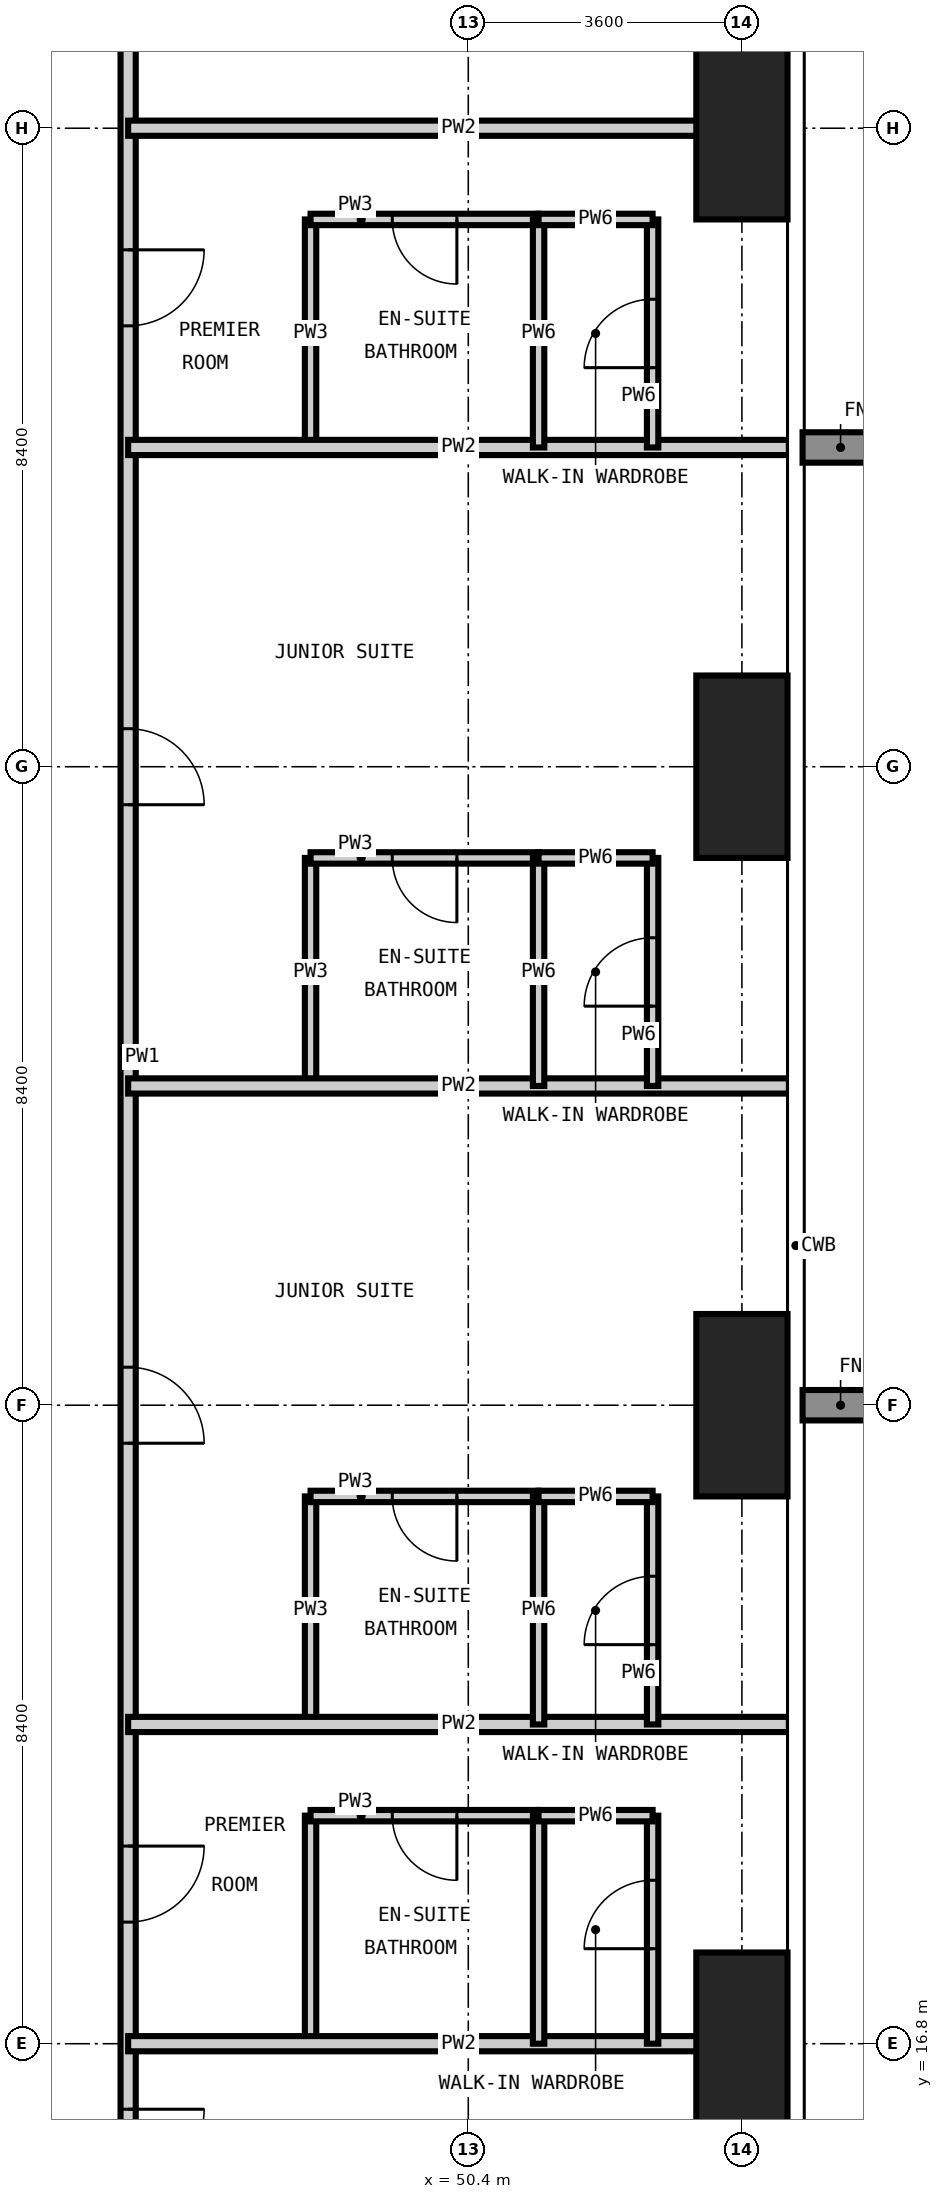
"""IFC4 building model, lengths in metres.
Left out: names, types, materials, properties, quantities, classifications, styles, units other than length and angle.
Written with IfcOpenShell. Run it as: python <this file> out.ifc"""

import sys

from ifc_helpers import new_model, si_unit, direction, frame, frame_2d, origin, origin_2d, place, context, subcontext, project, spatial, rectangle, extrude, element, fill, save


model = new_model("IFC4")
c1 = context("Model", 3, precision=1e-05, world=origin(), true_north=direction((0.0, 1.0)))
c2 = subcontext(c1, "Body", "Model", "MODEL_VIEW")
j1 = project(units=[si_unit("LENGTHUNIT", "METRE"), si_unit("PLANEANGLEUNIT", "RADIAN")], contexts=[c1])
p1 = place(None, origin())
s1 = spatial("IfcSite", under=j1, at=p1, CompositionType="ELEMENT")
p2 = place(p1, origin())
s2 = spatial("IfcBuilding", under=s1, at=p2, CompositionType="ELEMENT")
p3 = place(p2, frame((0.0, 0.0, 100.8)))
s3 = spatial("IfcBuildingStorey", under=s2, at=p3, CompositionType="ELEMENT", Elevation=100.8)
for number, where, z_axis, x_axis in (
    (1, (54.0, 16.8, -0.35), (0.0, 0.0, 1.0), (1.0, 0.0, 0.0)),
    (2, (54.0, 25.2, -0.35), (0.0, 0.0, 1.0), (1.0, 0.0, 0.0)),
    (3, (54.0, 33.6, -0.35), (0.0, 0.0, 1.0), (1.0, 0.0, 0.0)),
    (4, (54.0, 42.0, -0.35), (0.0, 0.0, 1.0), (1.0, 0.0, 0.0)),
):
    element("IfcColumn", number, at=place(p3, frame(where, z_axis=z_axis, x_axis=x_axis)), inside=s3, PredefinedType="COLUMN", context=c2, shape_type="SweptSolid", body=[
        extrude(rectangle(XDim=1.2, YDim=2.4, at=origin_2d()), origin(), (0.0, 0.0, 1.0), 3.6),
    ])
for number, where, z_axis, x_axis in (
    (5, (48.325, 16.8, 0.0), (0.0, 0.0, 1.0), (0.0, 1.0, 0.0)),
    (6, (48.325, 21.0, 0.0), (0.0, 0.0, 1.0), (0.0, 1.0, 0.0)),
    (7, (48.325, 29.4, 0.0), (0.0, 0.0, 1.0), (0.0, 1.0, 0.0)),
    (8, (48.325, 37.8, 0.0), (0.0, 0.0, 1.0), (0.0, 1.0, 0.0)),
):
    element("IfcWall", number, at=place(p3, frame(where, z_axis=z_axis, x_axis=x_axis)), inside=s3, PredefinedType="PARTITIONING", context=c2, shape_type="SweptSolid", body=[
        extrude(rectangle(XDim=3.0, YDim=0.15, at=frame_2d((1.5, 0.0))), origin(), (0.0, 0.0, 1.0), 3.25),
    ])
p4 = place(p3, frame((48.325, 19.8, 0.0), z_axis=(0.0, 0.0, 1.0), x_axis=(1.0, 0.0, 0.0)))
e9 = element("IfcWall", 9, at=p4, inside=s3, PredefinedType="PARTITIONING", context=c2, shape_type="SweptSolid", body=[
    extrude(rectangle(XDim=3.0, YDim=0.15, at=frame_2d((1.5, 0.0))), origin(), (0.0, 0.0, 1.0), 3.25),
])
p5 = place(p4, frame((1.075, 0.0, 0.0)))
e10 = element("IfcOpeningElement", 10, at=p5, cuts=e9, PredefinedType="OPENING", context=c2, shape_type="SweptSolid", body=[
    extrude(rectangle(XDim=0.85, YDim=2.1, at=frame_2d((0.425, 1.05))), frame((0.0, 0.085, 0.0), z_axis=(0.0, -1.0, 0.0), x_axis=(1.0, 0.0, 0.0)), (0.0, 0.0, 1.0), 0.17),
])
p6 = place(p3, frame((48.325, 24.0, 0.0), z_axis=(0.0, 0.0, 1.0), x_axis=(1.0, 0.0, 0.0)))
e11 = element("IfcWall", 11, at=p6, inside=s3, PredefinedType="PARTITIONING", context=c2, shape_type="SweptSolid", body=[
    extrude(rectangle(XDim=3.0, YDim=0.15, at=frame_2d((1.5, 0.0))), origin(), (0.0, 0.0, 1.0), 3.25),
])
p7 = place(p6, frame((1.075, 0.0, 0.0)))
e12 = element("IfcOpeningElement", 12, at=p7, cuts=e11, PredefinedType="OPENING", context=c2, shape_type="SweptSolid", body=[
    extrude(rectangle(XDim=0.85, YDim=2.1, at=frame_2d((0.425, 1.05))), frame((0.0, 0.085, 0.0), z_axis=(0.0, -1.0, 0.0), x_axis=(1.0, 0.0, 0.0)), (0.0, 0.0, 1.0), 0.17),
])
p8 = place(p3, frame((48.325, 32.4, 0.0), z_axis=(0.0, 0.0, 1.0), x_axis=(1.0, 0.0, 0.0)))
e13 = element("IfcWall", 13, at=p8, inside=s3, PredefinedType="PARTITIONING", context=c2, shape_type="SweptSolid", body=[
    extrude(rectangle(XDim=3.0, YDim=0.15, at=frame_2d((1.5, 0.0))), origin(), (0.0, 0.0, 1.0), 3.25),
])
p9 = place(p8, frame((1.075, 0.0, 0.0)))
e14 = element("IfcOpeningElement", 14, at=p9, cuts=e13, PredefinedType="OPENING", context=c2, shape_type="SweptSolid", body=[
    extrude(rectangle(XDim=0.85, YDim=2.1, at=frame_2d((0.425, 1.05))), frame((0.0, 0.085, 0.0), z_axis=(0.0, -1.0, 0.0), x_axis=(1.0, 0.0, 0.0)), (0.0, 0.0, 1.0), 0.17),
])
p10 = place(p3, frame((48.325, 40.8, 0.0), z_axis=(0.0, 0.0, 1.0), x_axis=(1.0, 0.0, 0.0)))
e15 = element("IfcWall", 15, at=p10, inside=s3, PredefinedType="PARTITIONING", context=c2, shape_type="SweptSolid", body=[
    extrude(rectangle(XDim=3.0, YDim=0.15, at=frame_2d((1.5, 0.0))), origin(), (0.0, 0.0, 1.0), 3.25),
])
p11 = place(p10, frame((1.075, 0.0, 0.0)))
e16 = element("IfcOpeningElement", 16, at=p11, cuts=e15, PredefinedType="OPENING", context=c2, shape_type="SweptSolid", body=[
    extrude(rectangle(XDim=0.85, YDim=2.1, at=frame_2d((0.425, 1.05))), frame((0.0, 0.085, 0.0), z_axis=(0.0, -1.0, 0.0), x_axis=(1.0, 0.0, 0.0)), (0.0, 0.0, 1.0), 0.17),
])
p12 = place(p3, frame((45.925, 45.325, 0.0), z_axis=(0.0, 0.0, 1.0), x_axis=(0.0, -1.0, 0.0)))
e17 = element("IfcWall", 17, at=p12, inside=s3, PredefinedType="PARTITIONING", context=c2, shape_type="SweptSolid", body=[
    extrude(rectangle(XDim=31.25, YDim=0.2, at=frame_2d((15.625, 0.0))), origin(), (0.0, 0.0, 1.0), 3.25),
])
p13 = place(p12, frame((25.925, 0.0, 0.0)))
e18 = element("IfcOpeningElement", 18, at=p13, cuts=e17, PredefinedType="OPENING", context=c2, shape_type="SweptSolid", body=[
    extrude(rectangle(XDim=1.0, YDim=2.2, at=frame_2d((0.5, 1.1))), frame((0.0, 0.11, 0.0), z_axis=(0.0, -1.0, 0.0), x_axis=(1.0, 0.0, 0.0)), (0.0, 0.0, 1.0), 0.22),
])
p14 = place(p12, frame((19.625, 0.0, 0.0)))
e19 = element("IfcOpeningElement", 19, at=p14, cuts=e17, PredefinedType="OPENING", context=c2, shape_type="SweptSolid", body=[
    extrude(rectangle(XDim=1.0, YDim=2.2, at=frame_2d((0.5, 1.1))), frame((0.0, 0.11, 0.0), z_axis=(0.0, -1.0, 0.0), x_axis=(1.0, 0.0, 0.0)), (0.0, 0.0, 1.0), 0.22),
])
p15 = place(p12, frame((11.225, 0.0, 0.0)))
e20 = element("IfcOpeningElement", 20, at=p15, cuts=e17, PredefinedType="OPENING", context=c2, shape_type="SweptSolid", body=[
    extrude(rectangle(XDim=1.0, YDim=2.2, at=frame_2d((0.5, 1.1))), frame((0.0, 0.11, 0.0), z_axis=(0.0, -1.0, 0.0), x_axis=(1.0, 0.0, 0.0)), (0.0, 0.0, 1.0), 0.22),
])
p16 = place(p12, frame((4.925, 0.0, 0.0)))
e21 = element("IfcOpeningElement", 21, at=p16, cuts=e17, PredefinedType="OPENING", context=c2, shape_type="SweptSolid", body=[
    extrude(rectangle(XDim=1.0, YDim=2.2, at=frame_2d((0.5, 1.1))), frame((0.0, 0.11, 0.0), z_axis=(0.0, -1.0, 0.0), x_axis=(1.0, 0.0, 0.0)), (0.0, 0.0, 1.0), 0.22),
])
p17 = place(p12, frame((29.387, 0.0, 0.0)))
e22 = element("IfcOpeningElement", 22, at=p17, cuts=e17, PredefinedType="OPENING", context=c2, shape_type="SweptSolid", body=[
    extrude(rectangle(XDim=1.0, YDim=2.2, at=frame_2d((0.5, 1.1))), frame((0.0, 0.11, 0.0), z_axis=(0.0, -1.0, 0.0), x_axis=(1.0, 0.0, 0.0)), (0.0, 0.0, 1.0), 0.22),
])
p18 = place(p12, frame((1.162, 0.0, 0.0)))
e23 = element("IfcOpeningElement", 23, at=p18, cuts=e17, PredefinedType="OPENING", context=c2, shape_type="SweptSolid", body=[
    extrude(rectangle(XDim=1.0, YDim=2.2, at=frame_2d((0.5, 1.1))), frame((0.0, 0.11, 0.0), z_axis=(0.0, -1.0, 0.0), x_axis=(1.0, 0.0, 0.0)), (0.0, 0.0, 1.0), 0.22),
])
for number, where, z_axis, x_axis in (
    (24, (45.925, 16.8, 0.0), (0.0, 0.0, 1.0), (1.0, 0.0, 0.0)),
    (25, (45.925, 21.0, 0.0), (0.0, 0.0, 1.0), (1.0, 0.0, 0.0)),
    (26, (45.925, 29.4, 0.0), (0.0, 0.0, 1.0), (1.0, 0.0, 0.0)),
    (27, (45.925, 37.8, 0.0), (0.0, 0.0, 1.0), (1.0, 0.0, 0.0)),
    (28, (45.925, 42.0, 0.0), (0.0, 0.0, 1.0), (1.0, 0.0, 0.0)),
):
    element("IfcWall", number, at=place(p3, frame(where, z_axis=z_axis, x_axis=x_axis)), inside=s3, PredefinedType="PARTITIONING", context=c2, shape_type="SweptSolid", body=[
        extrude(rectangle(XDim=8.693, YDim=0.2, at=frame_2d((4.346, 0.0))), origin(), (0.0, 0.0, 1.0), 3.25),
    ])
for number, where, z_axis, x_axis in (
    (29, (51.325, 16.8, 0.0), (0.0, 0.0, 1.0), (0.0, 1.0, 0.0)),
    (30, (51.325, 21.0, 0.0), (0.0, 0.0, 1.0), (0.0, 1.0, 0.0)),
    (31, (51.325, 29.4, 0.0), (0.0, 0.0, 1.0), (0.0, 1.0, 0.0)),
    (32, (51.325, 37.8, 0.0), (0.0, 0.0, 1.0), (0.0, 1.0, 0.0)),
):
    element("IfcWall", number, at=place(p3, frame(where, z_axis=z_axis, x_axis=x_axis)), inside=s3, PredefinedType="PARTITIONING", context=c2, shape_type="SweptSolid", body=[
        extrude(rectangle(XDim=3.0, YDim=0.15, at=frame_2d((1.5, 0.0))), origin(), (0.0, 0.0, 1.0), 3.25),
    ])
p19 = place(p3, frame((52.825, 16.8, 0.0), z_axis=(0.0, 0.0, 1.0), x_axis=(0.0, 1.0, 0.0)))
e33 = element("IfcWall", 33, at=p19, inside=s3, PredefinedType="PARTITIONING", context=c2, shape_type="SweptSolid", body=[
    extrude(rectangle(XDim=3.0, YDim=0.15, at=frame_2d((1.5, 0.0))), origin(), (0.0, 0.0, 1.0), 3.25),
])
p20 = place(p19, frame((1.25, 0.0, 0.0)))
e34 = element("IfcOpeningElement", 34, at=p20, cuts=e33, PredefinedType="OPENING", context=c2, shape_type="SweptSolid", body=[
    extrude(rectangle(XDim=0.9, YDim=2.1, at=frame_2d((0.45, 1.05))), frame((0.0, 0.085, 0.0), z_axis=(0.0, -1.0, 0.0), x_axis=(1.0, 0.0, 0.0)), (0.0, 0.0, 1.0), 0.17),
])
p21 = place(p3, frame((52.825, 21.0, 0.0), z_axis=(0.0, 0.0, 1.0), x_axis=(0.0, 1.0, 0.0)))
e35 = element("IfcWall", 35, at=p21, inside=s3, PredefinedType="PARTITIONING", context=c2, shape_type="SweptSolid", body=[
    extrude(rectangle(XDim=3.0, YDim=0.15, at=frame_2d((1.5, 0.0))), origin(), (0.0, 0.0, 1.0), 3.25),
])
p22 = place(p21, frame((1.05, 0.0, 0.0)))
e36 = element("IfcOpeningElement", 36, at=p22, cuts=e35, PredefinedType="OPENING", context=c2, shape_type="SweptSolid", body=[
    extrude(rectangle(XDim=0.9, YDim=2.1, at=frame_2d((0.45, 1.05))), frame((0.0, 0.085, 0.0), z_axis=(0.0, -1.0, 0.0), x_axis=(1.0, 0.0, 0.0)), (0.0, 0.0, 1.0), 0.17),
])
p23 = place(p3, frame((52.825, 29.4, 0.0), z_axis=(0.0, 0.0, 1.0), x_axis=(0.0, 1.0, 0.0)))
e37 = element("IfcWall", 37, at=p23, inside=s3, PredefinedType="PARTITIONING", context=c2, shape_type="SweptSolid", body=[
    extrude(rectangle(XDim=3.0, YDim=0.15, at=frame_2d((1.5, 0.0))), origin(), (0.0, 0.0, 1.0), 3.25),
])
p24 = place(p23, frame((1.05, 0.0, 0.0)))
e38 = element("IfcOpeningElement", 38, at=p24, cuts=e37, PredefinedType="OPENING", context=c2, shape_type="SweptSolid", body=[
    extrude(rectangle(XDim=0.9, YDim=2.1, at=frame_2d((0.45, 1.05))), frame((0.0, 0.085, 0.0), z_axis=(0.0, -1.0, 0.0), x_axis=(1.0, 0.0, 0.0)), (0.0, 0.0, 1.0), 0.17),
])
p25 = place(p3, frame((52.825, 37.8, 0.0), z_axis=(0.0, 0.0, 1.0), x_axis=(0.0, 1.0, 0.0)))
e39 = element("IfcWall", 39, at=p25, inside=s3, PredefinedType="PARTITIONING", context=c2, shape_type="SweptSolid", body=[
    extrude(rectangle(XDim=3.0, YDim=0.15, at=frame_2d((1.5, 0.0))), origin(), (0.0, 0.0, 1.0), 3.25),
])
p26 = place(p25, frame((1.05, 0.0, 0.0)))
e40 = element("IfcOpeningElement", 40, at=p26, cuts=e39, PredefinedType="OPENING", context=c2, shape_type="SweptSolid", body=[
    extrude(rectangle(XDim=0.9, YDim=2.1, at=frame_2d((0.45, 1.05))), frame((0.0, 0.085, 0.0), z_axis=(0.0, -1.0, 0.0), x_axis=(1.0, 0.0, 0.0)), (0.0, 0.0, 1.0), 0.17),
])
for number, where, z_axis, x_axis in (
    (41, (51.325, 19.8, 0.0), (0.0, 0.0, 1.0), (1.0, 0.0, 0.0)),
    (42, (51.325, 24.0, 0.0), (0.0, 0.0, 1.0), (1.0, 0.0, 0.0)),
    (43, (51.325, 32.4, 0.0), (0.0, 0.0, 1.0), (1.0, 0.0, 0.0)),
    (44, (51.325, 40.8, 0.0), (0.0, 0.0, 1.0), (1.0, 0.0, 0.0)),
):
    element("IfcWall", number, at=place(p3, frame(where, z_axis=z_axis, x_axis=x_axis)), inside=s3, PredefinedType="PARTITIONING", context=c2, shape_type="SweptSolid", body=[
        extrude(rectangle(XDim=1.5, YDim=0.15, at=frame_2d((0.75, 0.0))), origin(), (0.0, 0.0, 1.0), 3.25),
    ])
p27 = place(p13, origin())
e45 = element("IfcDoor", 45, at=p27, inside=s3, OperationType="SINGLE_SWING_LEFT", PredefinedType="DOOR", context=c2, shape_type="SweptSolid", body=[
    extrude(rectangle(XDim=1.0, YDim=2.2, at=frame_2d((0.5, 1.1))), frame((0.0, 0.025, 0.0), z_axis=(0.0, -1.0, 0.0), x_axis=(1.0, 0.0, 0.0)), (0.0, 0.0, 1.0), 0.05),
])
fill(e18, e45)
p28 = place(p5, frame((0.85, 0.0, 0.0), z_axis=(0.0, 0.0, 1.0), x_axis=(-1.0, 0.0, 0.0)))
e46 = element("IfcDoor", 46, at=p28, inside=s3, OperationType="SINGLE_SWING_LEFT", PredefinedType="DOOR", context=c2, shape_type="SweptSolid", body=[
    extrude(rectangle(XDim=0.85, YDim=2.1, at=frame_2d((0.425, 1.05))), frame((0.0, 0.025, 0.0), z_axis=(0.0, -1.0, 0.0), x_axis=(1.0, 0.0, 0.0)), (0.0, 0.0, 1.0), 0.05),
])
fill(e10, e46)
p29 = place(p20, origin())
e47 = element("IfcDoor", 47, at=p29, inside=s3, OperationType="SINGLE_SWING_LEFT", PredefinedType="DOOR", context=c2, shape_type="SweptSolid", body=[
    extrude(rectangle(XDim=0.9, YDim=2.1, at=frame_2d((0.45, 1.05))), frame((0.0, 0.025, 0.0), z_axis=(0.0, -1.0, 0.0), x_axis=(1.0, 0.0, 0.0)), (0.0, 0.0, 1.0), 0.05),
])
fill(e34, e47)
p30 = place(p14, origin())
e48 = element("IfcDoor", 48, at=p30, inside=s3, OperationType="SINGLE_SWING_RIGHT", PredefinedType="DOOR", context=c2, shape_type="SweptSolid", body=[
    extrude(rectangle(XDim=1.0, YDim=2.2, at=frame_2d((0.5, 1.1))), frame((0.0, 0.025, 0.0), z_axis=(0.0, -1.0, 0.0), x_axis=(1.0, 0.0, 0.0)), (0.0, 0.0, 1.0), 0.05),
])
fill(e19, e48)
p31 = place(p7, frame((0.85, 0.0, 0.0), z_axis=(0.0, 0.0, 1.0), x_axis=(-1.0, 0.0, 0.0)))
e49 = element("IfcDoor", 49, at=p31, inside=s3, OperationType="SINGLE_SWING_LEFT", PredefinedType="DOOR", context=c2, shape_type="SweptSolid", body=[
    extrude(rectangle(XDim=0.85, YDim=2.1, at=frame_2d((0.425, 1.05))), frame((0.0, 0.025, 0.0), z_axis=(0.0, -1.0, 0.0), x_axis=(1.0, 0.0, 0.0)), (0.0, 0.0, 1.0), 0.05),
])
fill(e12, e49)
p32 = place(p22, origin())
e50 = element("IfcDoor", 50, at=p32, inside=s3, OperationType="SINGLE_SWING_LEFT", PredefinedType="DOOR", context=c2, shape_type="SweptSolid", body=[
    extrude(rectangle(XDim=0.9, YDim=2.1, at=frame_2d((0.45, 1.05))), frame((0.0, 0.025, 0.0), z_axis=(0.0, -1.0, 0.0), x_axis=(1.0, 0.0, 0.0)), (0.0, 0.0, 1.0), 0.05),
])
fill(e36, e50)
p33 = place(p15, origin())
e51 = element("IfcDoor", 51, at=p33, inside=s3, OperationType="SINGLE_SWING_RIGHT", PredefinedType="DOOR", context=c2, shape_type="SweptSolid", body=[
    extrude(rectangle(XDim=1.0, YDim=2.2, at=frame_2d((0.5, 1.1))), frame((0.0, 0.025, 0.0), z_axis=(0.0, -1.0, 0.0), x_axis=(1.0, 0.0, 0.0)), (0.0, 0.0, 1.0), 0.05),
])
fill(e20, e51)
p34 = place(p9, frame((0.85, 0.0, 0.0), z_axis=(0.0, 0.0, 1.0), x_axis=(-1.0, 0.0, 0.0)))
e52 = element("IfcDoor", 52, at=p34, inside=s3, OperationType="SINGLE_SWING_LEFT", PredefinedType="DOOR", context=c2, shape_type="SweptSolid", body=[
    extrude(rectangle(XDim=0.85, YDim=2.1, at=frame_2d((0.425, 1.05))), frame((0.0, 0.025, 0.0), z_axis=(0.0, -1.0, 0.0), x_axis=(1.0, 0.0, 0.0)), (0.0, 0.0, 1.0), 0.05),
])
fill(e14, e52)
p35 = place(p24, origin())
e53 = element("IfcDoor", 53, at=p35, inside=s3, OperationType="SINGLE_SWING_LEFT", PredefinedType="DOOR", context=c2, shape_type="SweptSolid", body=[
    extrude(rectangle(XDim=0.9, YDim=2.1, at=frame_2d((0.45, 1.05))), frame((0.0, 0.025, 0.0), z_axis=(0.0, -1.0, 0.0), x_axis=(1.0, 0.0, 0.0)), (0.0, 0.0, 1.0), 0.05),
])
fill(e38, e53)
p36 = place(p16, origin())
e54 = element("IfcDoor", 54, at=p36, inside=s3, OperationType="SINGLE_SWING_LEFT", PredefinedType="DOOR", context=c2, shape_type="SweptSolid", body=[
    extrude(rectangle(XDim=1.0, YDim=2.2, at=frame_2d((0.5, 1.1))), frame((0.0, 0.025, 0.0), z_axis=(0.0, -1.0, 0.0), x_axis=(1.0, 0.0, 0.0)), (0.0, 0.0, 1.0), 0.05),
])
fill(e21, e54)
p37 = place(p11, frame((0.85, 0.0, 0.0), z_axis=(0.0, 0.0, 1.0), x_axis=(-1.0, 0.0, 0.0)))
e55 = element("IfcDoor", 55, at=p37, inside=s3, OperationType="SINGLE_SWING_LEFT", PredefinedType="DOOR", context=c2, shape_type="SweptSolid", body=[
    extrude(rectangle(XDim=0.85, YDim=2.1, at=frame_2d((0.425, 1.05))), frame((0.0, 0.025, 0.0), z_axis=(0.0, -1.0, 0.0), x_axis=(1.0, 0.0, 0.0)), (0.0, 0.0, 1.0), 0.05),
])
fill(e16, e55)
p38 = place(p26, origin())
e56 = element("IfcDoor", 56, at=p38, inside=s3, OperationType="SINGLE_SWING_LEFT", PredefinedType="DOOR", context=c2, shape_type="SweptSolid", body=[
    extrude(rectangle(XDim=0.9, YDim=2.1, at=frame_2d((0.45, 1.05))), frame((0.0, 0.025, 0.0), z_axis=(0.0, -1.0, 0.0), x_axis=(1.0, 0.0, 0.0)), (0.0, 0.0, 1.0), 0.05),
])
fill(e40, e56)
p39 = place(p17, origin())
e57 = element("IfcDoor", 57, at=p39, inside=s3, OperationType="SINGLE_SWING_LEFT", PredefinedType="DOOR", context=c2, shape_type="SweptSolid", body=[
    extrude(rectangle(XDim=1.0, YDim=2.2, at=frame_2d((0.5, 1.1))), frame((0.0, 0.025, 0.0), z_axis=(0.0, -1.0, 0.0), x_axis=(1.0, 0.0, 0.0)), (0.0, 0.0, 1.0), 0.05),
])
fill(e22, e57)
save(model, sys.argv[1])
